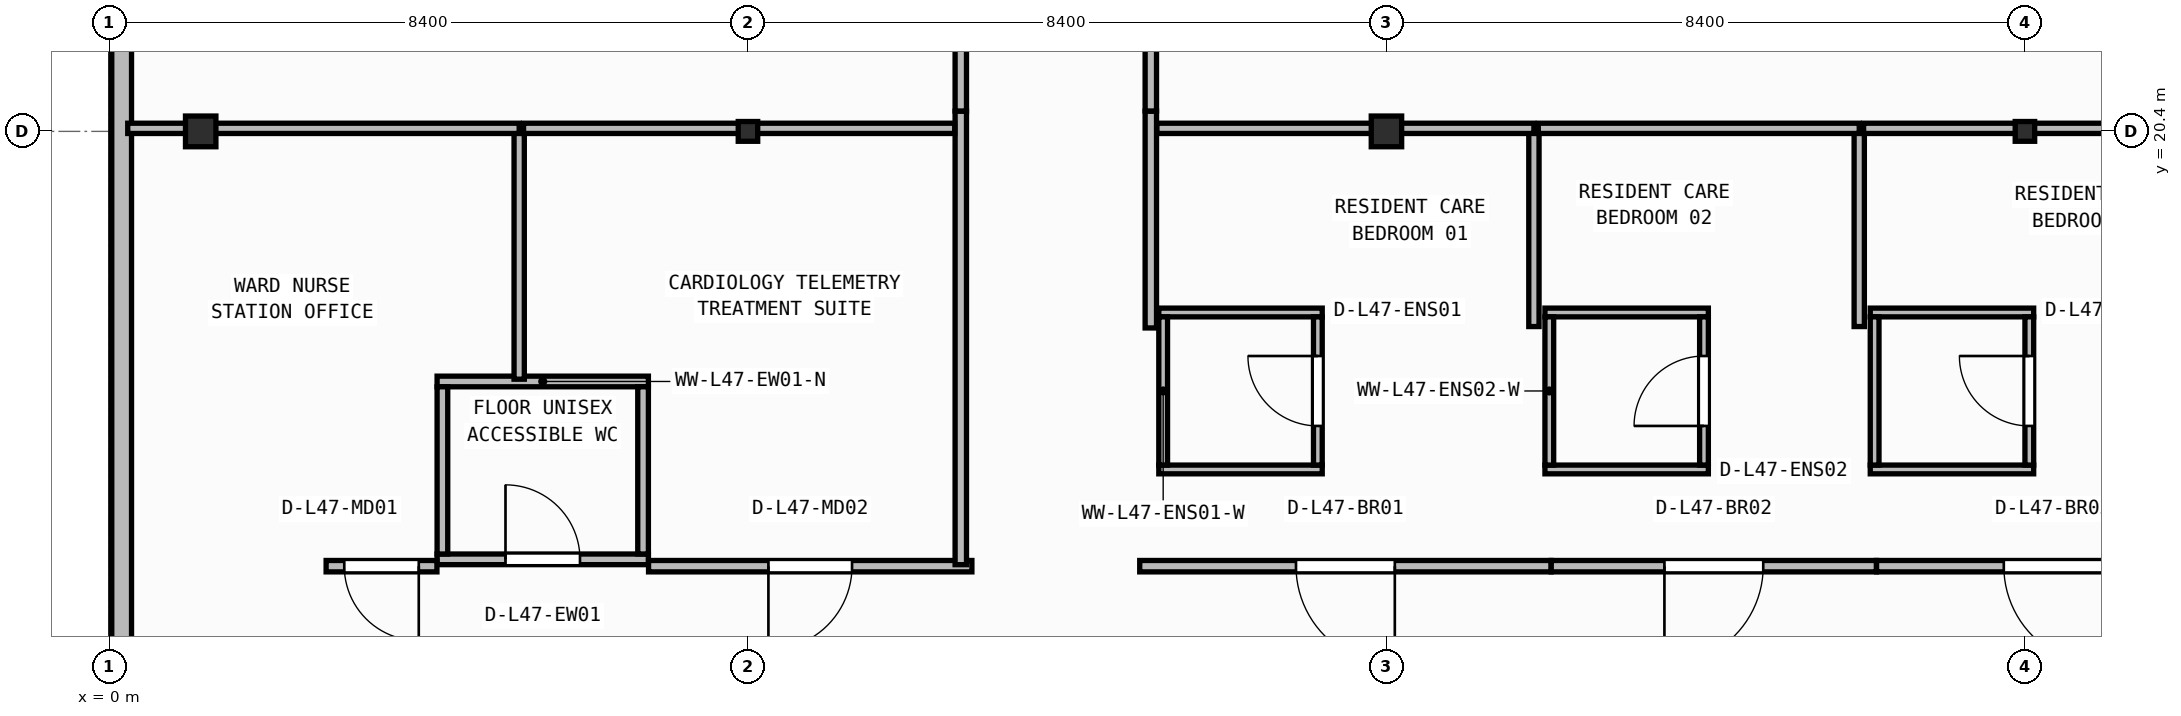
"""IFC4 building model, lengths in metres.
Left out: names, types, materials, properties, quantities, classifications, styles, units other than length and angle.
Written with IfcOpenShell. Run it as: python <this file> out.ifc"""

import sys

from ifc_helpers import new_model, si_unit, direction, frame, frame_2d, origin, origin_2d, place, context, subcontext, project, spatial, rectangle, i_section, extrude, element, fill, save


model = new_model("IFC4")
c1 = context("Model", 3, precision=1e-05, world=origin(), true_north=direction((0.0, 1.0)))
c2 = subcontext(c1, "Body", "Model", "MODEL_VIEW")
j1 = project(units=[si_unit("LENGTHUNIT", "METRE"), si_unit("PLANEANGLEUNIT", "RADIAN")], contexts=[c1])
p1 = place(None, origin())
s1 = spatial("IfcSite", under=j1, at=p1, CompositionType="ELEMENT")
p2 = place(p1, origin())
s2 = spatial("IfcBuilding", under=s1, at=p2, CompositionType="ELEMENT")
p3 = place(p2, frame((0.0, 0.0, 192.1)))
s3 = spatial("IfcBuildingStorey", under=s2, at=p3, CompositionType="ELEMENT", Elevation=192.1)
p4 = place(p3, frame((1.2, 20.4, 0.0), z_axis=(0.0, 0.0, 1.0), x_axis=(1.0, 0.0, 0.0)))
e1 = element("IfcColumn", 1, at=p4, inside=s3, PredefinedType="COLUMN", context=c2, shape_type="SweptSolid", body=[
    extrude(i_section(OverallWidth=0.4, OverallDepth=0.404, WebThickness=0.02, FlangeThickness=0.032, at=origin_2d()), origin(), (0.0, 0.0, 1.0), 3.95),
])
p5 = place(p3, frame((8.4, 20.4, 0.0), z_axis=(0.0, 0.0, 1.0), x_axis=(1.0, 0.0, 0.0)))
e2 = element("IfcColumn", 2, at=p5, inside=s3, PredefinedType="COLUMN", context=c2, shape_type="SweptSolid", body=[
    extrude(i_section(OverallWidth=0.256, OverallDepth=0.26, WebThickness=0.01, FlangeThickness=0.017, FilletRadius=0.013, at=origin_2d()), origin(), (0.0, 0.0, 1.0), 3.95),
])
p6 = place(p3, frame((16.8, 20.4, 0.0), z_axis=(0.0, 0.0, 1.0), x_axis=(1.0, 0.0, 0.0)))
e3 = element("IfcColumn", 3, at=p6, inside=s3, PredefinedType="COLUMN", context=c2, shape_type="SweptSolid", body=[
    extrude(i_section(OverallWidth=0.4, OverallDepth=0.404, WebThickness=0.02, FlangeThickness=0.032, at=origin_2d()), origin(), (0.0, 0.0, 1.0), 3.95),
])
p7 = place(p3, frame((25.2, 20.4, 0.0), z_axis=(0.0, 0.0, 1.0), x_axis=(1.0, 0.0, 0.0)))
e4 = element("IfcColumn", 4, at=p7, inside=s3, PredefinedType="COLUMN", context=c2, shape_type="SweptSolid", body=[
    extrude(i_section(OverallWidth=0.256, OverallDepth=0.26, WebThickness=0.01, FlangeThickness=0.017, FilletRadius=0.013, at=origin_2d()), origin(), (0.0, 0.0, 1.0), 3.95),
])
p8 = place(p3, frame((0.16, 40.14, 0.0), z_axis=(0.0, 0.0, 1.0), x_axis=(0.0, -1.0, 0.0)))
e5 = element("IfcWall", 5, at=p8, inside=s3, PredefinedType="STANDARD", context=c2, shape_type="SweptSolid", body=[
    extrude(rectangle(XDim=37.48, YDim=0.26, at=frame_2d((18.74, 0.0))), origin(), (0.0, 0.0, 1.0), 3.71),
])
p9 = place(p8, frame((27.4, 0.0, 0.9)))
e6 = element("IfcOpeningElement", 6, at=p9, cuts=e5, PredefinedType="OPENING", context=c2, shape_type="SweptSolid", body=[
    extrude(rectangle(XDim=2.4, YDim=1.65, at=frame_2d((1.2, 0.825))), frame((0.0, 0.14, 0.0), z_axis=(0.0, -1.0, 0.0), x_axis=(1.0, 0.0, 0.0)), (0.0, 0.0, 1.0), 0.28),
])
p10 = place(p3, frame((4.31, 14.77, 0.0), z_axis=(0.0, 0.0, 1.0), x_axis=(1.0, 0.0, 0.0)))
e7 = element("IfcWall", 7, at=p10, inside=s3, PredefinedType="PARTITIONING", context=c2, shape_type="SweptSolid", body=[
    extrude(rectangle(XDim=2.78, YDim=0.14, at=frame_2d((1.39, 0.0))), origin(), (0.0, 0.0, 1.0), 3.71),
])
p11 = place(p10, frame((0.9, 0.0, 0.0)))
e8 = element("IfcOpeningElement", 8, at=p11, cuts=e7, PredefinedType="OPENING", context=c2, shape_type="SweptSolid", body=[
    extrude(rectangle(XDim=0.98, YDim=2.1, at=frame_2d((0.49, 1.05))), frame((0.0, 0.08, 0.0), z_axis=(0.0, -1.0, 0.0), x_axis=(1.0, 0.0, 0.0)), (0.0, 0.0, 1.0), 0.16),
])
p12 = place(p3, frame((4.31, 17.11, 0.0), z_axis=(0.0, 0.0, 1.0), x_axis=(1.0, 0.0, 0.0)))
e9 = element("IfcWall", 9, at=p12, inside=s3, PredefinedType="PARTITIONING", context=c2, shape_type="SweptSolid", body=[
    extrude(rectangle(XDim=2.78, YDim=0.14, at=frame_2d((1.39, 0.0))), origin(), (0.0, 0.0, 1.0), 3.71),
])
for number, where, z_axis, x_axis in (
    (10, (4.38, 14.84, 0.0), (0.0, 0.0, 1.0), (0.0, 1.0, 0.0)),
    (11, (7.02, 14.84, 0.0), (0.0, 0.0, 1.0), (0.0, 1.0, 0.0)),
):
    element("IfcWall", number, at=place(p3, frame(where, z_axis=z_axis, x_axis=x_axis)), inside=s3, PredefinedType="PARTITIONING", context=c2, shape_type="SweptSolid", body=[
        extrude(rectangle(XDim=2.2, YDim=0.14, at=frame_2d((1.1, 0.0))), origin(), (0.0, 0.0, 1.0), 3.71),
    ])
for number, where, z_axis, x_axis in (
    (12, (13.805, 15.952, 0.0), (0.0, 0.0, 1.0), (1.0, 0.0, 0.0)),
    (13, (13.805, 18.018, 0.0), (0.0, 0.0, 1.0), (1.0, 0.0, 0.0)),
):
    element("IfcWall", number, at=place(p3, frame(where, z_axis=z_axis, x_axis=x_axis)), inside=s3, PredefinedType="PARTITIONING", context=c2, shape_type="SweptSolid", body=[
        extrude(rectangle(XDim=2.15, YDim=0.115, at=frame_2d((1.075, 0.0))), origin(), (0.0, 0.0, 1.0), 3.71),
    ])
p13 = place(p3, frame((13.863, 16.01, 0.0), z_axis=(0.0, 0.0, 1.0), x_axis=(0.0, 1.0, 0.0)))
e14 = element("IfcWall", 14, at=p13, inside=s3, PredefinedType="PARTITIONING", context=c2, shape_type="SweptSolid", body=[
    extrude(rectangle(XDim=1.95, YDim=0.115, at=frame_2d((0.975, 0.0))), origin(), (0.0, 0.0, 1.0), 3.71),
])
p14 = place(p3, frame((15.897, 16.01, 0.0), z_axis=(0.0, 0.0, 1.0), x_axis=(0.0, 1.0, 0.0)))
e15 = element("IfcWall", 15, at=p14, inside=s3, PredefinedType="PARTITIONING", context=c2, shape_type="SweptSolid", body=[
    extrude(rectangle(XDim=1.95, YDim=0.115, at=frame_2d((0.975, 0.0))), origin(), (0.0, 0.0, 1.0), 3.71),
])
p15 = place(p14, frame((0.515, 0.0, 0.0)))
e16 = element("IfcOpeningElement", 16, at=p15, cuts=e15, PredefinedType="OPENING", context=c2, shape_type="SweptSolid", body=[
    extrude(rectangle(XDim=0.92, YDim=2.1, at=frame_2d((0.46, 1.05))), frame((0.0, 0.067, 0.0), z_axis=(0.0, -1.0, 0.0), x_axis=(1.0, 0.0, 0.0)), (0.0, 0.0, 1.0), 0.135),
])
for number, where, z_axis, x_axis in (
    (17, (18.885, 15.952, 0.0), (0.0, 0.0, 1.0), (1.0, 0.0, 0.0)),
    (18, (18.885, 18.018, 0.0), (0.0, 0.0, 1.0), (1.0, 0.0, 0.0)),
):
    element("IfcWall", number, at=place(p3, frame(where, z_axis=z_axis, x_axis=x_axis)), inside=s3, PredefinedType="PARTITIONING", context=c2, shape_type="SweptSolid", body=[
        extrude(rectangle(XDim=2.15, YDim=0.115, at=frame_2d((1.075, 0.0))), origin(), (0.0, 0.0, 1.0), 3.71),
    ])
p16 = place(p3, frame((18.942, 16.01, 0.0), z_axis=(0.0, 0.0, 1.0), x_axis=(0.0, 1.0, 0.0)))
e19 = element("IfcWall", 19, at=p16, inside=s3, PredefinedType="PARTITIONING", context=c2, shape_type="SweptSolid", body=[
    extrude(rectangle(XDim=1.95, YDim=0.115, at=frame_2d((0.975, 0.0))), origin(), (0.0, 0.0, 1.0), 3.71),
])
p17 = place(p3, frame((20.978, 16.01, 0.0), z_axis=(0.0, 0.0, 1.0), x_axis=(0.0, 1.0, 0.0)))
e20 = element("IfcWall", 20, at=p17, inside=s3, PredefinedType="PARTITIONING", context=c2, shape_type="SweptSolid", body=[
    extrude(rectangle(XDim=1.95, YDim=0.115, at=frame_2d((0.975, 0.0))), origin(), (0.0, 0.0, 1.0), 3.71),
])
p18 = place(p17, frame((0.515, 0.0, 0.0)))
e21 = element("IfcOpeningElement", 21, at=p18, cuts=e20, PredefinedType="OPENING", context=c2, shape_type="SweptSolid", body=[
    extrude(rectangle(XDim=0.92, YDim=2.1, at=frame_2d((0.46, 1.05))), frame((0.0, 0.067, 0.0), z_axis=(0.0, -1.0, 0.0), x_axis=(1.0, 0.0, 0.0)), (0.0, 0.0, 1.0), 0.135),
])
p19 = place(p3, frame((23.165, 15.952, 0.0), z_axis=(0.0, 0.0, 1.0), x_axis=(1.0, 0.0, 0.0)))
e22 = element("IfcWall", 22, at=p19, inside=s3, PredefinedType="PARTITIONING", context=c2, shape_type="SweptSolid", body=[
    extrude(rectangle(XDim=2.15, YDim=0.115, at=frame_2d((1.075, 0.0))), origin(), (0.0, 0.0, 1.0), 3.329),
])
p20 = place(p3, frame((23.165, 18.018, 0.0), z_axis=(0.0, 0.0, 1.0), x_axis=(1.0, 0.0, 0.0)))
e23 = element("IfcWall", 23, at=p20, inside=s3, PredefinedType="PARTITIONING", context=c2, shape_type="SweptSolid", body=[
    extrude(rectangle(XDim=2.15, YDim=0.115, at=frame_2d((1.075, 0.0))), origin(), (0.0, 0.0, 1.0), 3.71),
])
p21 = place(p3, frame((23.222, 16.01, 0.0), z_axis=(0.0, 0.0, 1.0), x_axis=(0.0, 1.0, 0.0)))
e24 = element("IfcWall", 24, at=p21, inside=s3, PredefinedType="PARTITIONING", context=c2, shape_type="SweptSolid", body=[
    extrude(rectangle(XDim=1.95, YDim=0.115, at=frame_2d((0.975, 0.0))), origin(), (0.0, 0.0, 1.0), 3.71),
])
p22 = place(p3, frame((25.258, 16.01, 0.0), z_axis=(0.0, 0.0, 1.0), x_axis=(0.0, 1.0, 0.0)))
e25 = element("IfcWall", 25, at=p22, inside=s3, PredefinedType="PARTITIONING", context=c2, shape_type="SweptSolid", body=[
    extrude(rectangle(XDim=1.95, YDim=0.115, at=frame_2d((0.975, 0.0))), origin(), (0.0, 0.0, 1.0), 3.152),
])
p23 = place(p22, frame((0.515, 0.0, 0.0)))
e26 = element("IfcOpeningElement", 26, at=p23, cuts=e25, PredefinedType="OPENING", context=c2, shape_type="SweptSolid", body=[
    extrude(rectangle(XDim=0.92, YDim=2.1, at=frame_2d((0.46, 1.05))), frame((0.0, 0.067, 0.0), z_axis=(0.0, -1.0, 0.0), x_axis=(1.0, 0.0, 0.0)), (0.0, 0.0, 1.0), 0.135),
])
p24 = place(p3, frame((4.308, 14.68, 0.0), z_axis=(0.0, 0.0, 1.0), x_axis=(-1.0, 0.0, 0.0)))
e27 = element("IfcWall", 27, at=p24, inside=s3, PredefinedType="PARTITIONING", context=c2, shape_type="SweptSolid", body=[
    extrude(rectangle(XDim=1.458, YDim=0.15, at=frame_2d((0.729, 0.0))), origin(), (0.0, 0.0, 1.0), 3.71),
])
p25 = place(p24, frame((0.239, 0.0, 0.0)))
e28 = element("IfcOpeningElement", 28, at=p25, cuts=e27, PredefinedType="OPENING", context=c2, shape_type="SweptSolid", body=[
    extrude(rectangle(XDim=0.98, YDim=2.1, at=frame_2d((0.49, 1.05))), frame((0.0, 0.085, 0.0), z_axis=(0.0, -1.0, 0.0), x_axis=(1.0, 0.0, 0.0)), (0.0, 0.0, 1.0), 0.17),
])
p26 = place(p3, frame((11.346, 14.68, 0.0), z_axis=(0.0, 0.0, 1.0), x_axis=(-1.0, 0.0, 0.0)))
e29 = element("IfcWall", 29, at=p26, inside=s3, PredefinedType="PARTITIONING", context=c2, shape_type="SweptSolid", body=[
    extrude(rectangle(XDim=4.254, YDim=0.15, at=frame_2d((2.127, 0.0))), origin(), (0.0, 0.0, 1.0), 3.71),
])
p27 = place(p26, frame((1.577, 0.0, 0.0)))
e30 = element("IfcOpeningElement", 30, at=p27, cuts=e29, PredefinedType="OPENING", context=c2, shape_type="SweptSolid", body=[
    extrude(rectangle(XDim=1.1, YDim=2.1, at=frame_2d((0.55, 1.05))), frame((0.0, 0.085, 0.0), z_axis=(0.0, -1.0, 0.0), x_axis=(1.0, 0.0, 0.0)), (0.0, 0.0, 1.0), 0.17),
])
p28 = place(p3, frame((18.966, 14.68, 0.0), z_axis=(0.0, 0.0, 1.0), x_axis=(-1.0, 0.0, 0.0)))
e31 = element("IfcWall", 31, at=p28, inside=s3, PredefinedType="PARTITIONING", context=c2, shape_type="SweptSolid", body=[
    extrude(rectangle(XDim=5.412, YDim=0.15, at=frame_2d((2.706, 0.0))), origin(), (0.0, 0.0, 1.0), 3.71),
])
p29 = place(p28, frame((2.056, 0.0, 0.0)))
e32 = element("IfcOpeningElement", 32, at=p29, cuts=e31, PredefinedType="OPENING", context=c2, shape_type="SweptSolid", body=[
    extrude(rectangle(XDim=1.3, YDim=2.15, at=frame_2d((0.65, 1.075))), frame((0.0, 0.085, 0.0), z_axis=(0.0, -1.0, 0.0), x_axis=(1.0, 0.0, 0.0)), (0.0, 0.0, 1.0), 0.17),
])
p30 = place(p3, frame((23.246, 14.68, 0.0), z_axis=(0.0, 0.0, 1.0), x_axis=(-1.0, 0.0, 0.0)))
e33 = element("IfcWall", 33, at=p30, inside=s3, PredefinedType="PARTITIONING", context=c2, shape_type="SweptSolid", body=[
    extrude(rectangle(XDim=4.278, YDim=0.15, at=frame_2d((2.139, 0.0))), origin(), (0.0, 0.0, 1.0), 3.71),
])
p31 = place(p30, frame((1.489, 0.0, 0.0)))
e34 = element("IfcOpeningElement", 34, at=p31, cuts=e33, PredefinedType="OPENING", context=c2, shape_type="SweptSolid", body=[
    extrude(rectangle(XDim=1.3, YDim=2.15, at=frame_2d((0.65, 1.075))), frame((0.0, 0.085, 0.0), z_axis=(0.0, -1.0, 0.0), x_axis=(1.0, 0.0, 0.0)), (0.0, 0.0, 1.0), 0.17),
])
p32 = place(p3, frame((27.896, 14.68, 0.0), z_axis=(0.0, 0.0, 1.0), x_axis=(-1.0, 0.0, 0.0)))
e35 = element("IfcWall", 35, at=p32, inside=s3, PredefinedType="PARTITIONING", context=c2, shape_type="SweptSolid", body=[
    extrude(rectangle(XDim=4.648, YDim=0.15, at=frame_2d((2.324, 0.0))), origin(), (0.0, 0.0, 1.0), 3.71),
])
p33 = place(p32, frame((1.674, 0.0, 0.0)))
e36 = element("IfcOpeningElement", 36, at=p33, cuts=e35, PredefinedType="OPENING", context=c2, shape_type="SweptSolid", body=[
    extrude(rectangle(XDim=1.3, YDim=2.15, at=frame_2d((0.65, 1.075))), frame((0.0, 0.085, 0.0), z_axis=(0.0, -1.0, 0.0), x_axis=(1.0, 0.0, 0.0)), (0.0, 0.0, 1.0), 0.17),
])
p34 = place(p3, frame((11.2, 20.666, 0.0), z_axis=(0.0, 0.0, 1.0), x_axis=(0.0, -1.0, 0.0)))
e37 = element("IfcWall", 37, at=p34, inside=s3, PredefinedType="PARTITIONING", context=c2, shape_type="SweptSolid", body=[
    extrude(rectangle(XDim=5.966, YDim=0.15, at=frame_2d((2.983, 0.0))), origin(), (0.0, 0.0, 1.0), 3.71),
])
p35 = place(p3, frame((13.7, 17.814, 0.0), z_axis=(0.0, 0.0, 1.0), x_axis=(0.0, 1.0, 0.0)))
e38 = element("IfcWall", 38, at=p35, inside=s3, PredefinedType="PARTITIONING", context=c2, shape_type="SweptSolid", body=[
    extrude(rectangle(XDim=2.852, YDim=0.15, at=frame_2d((1.426, 0.0))), origin(), (0.0, 0.0, 1.0), 3.71),
])
p36 = place(p3, frame((11.2, 27.26, 0.0), z_axis=(0.0, 0.0, 1.0), x_axis=(0.0, -1.0, 0.0)))
e39 = element("IfcWall", 39, at=p36, inside=s3, PredefinedType="PARTITIONING", context=c2, shape_type="SweptSolid", body=[
    extrude(rectangle(XDim=6.592, YDim=0.15, at=frame_2d((3.296, 0.0))), origin(), (0.0, 0.0, 1.0), 3.71),
])
p37 = place(p36, frame((2.746, 0.0, 0.0)))
e40 = element("IfcOpeningElement", 40, at=p37, cuts=e39, PredefinedType="OPENING", context=c2, shape_type="SweptSolid", body=[
    extrude(rectangle(XDim=1.1, YDim=2.1, at=frame_2d((0.55, 1.05))), frame((0.0, 0.085, 0.0), z_axis=(0.0, -1.0, 0.0), x_axis=(1.0, 0.0, 0.0)), (0.0, 0.0, 1.0), 0.17),
])
p38 = place(p3, frame((13.7, 20.668, 0.0), z_axis=(0.0, 0.0, 1.0), x_axis=(0.0, 1.0, 0.0)))
e41 = element("IfcWall", 41, at=p38, inside=s3, PredefinedType="PARTITIONING", context=c2, shape_type="SweptSolid", body=[
    extrude(rectangle(XDim=6.592, YDim=0.15, at=frame_2d((3.296, 0.0))), origin(), (0.0, 0.0, 1.0), 3.71),
])
p39 = place(p38, frame((2.746, 0.0, 0.0)))
e42 = element("IfcOpeningElement", 42, at=p39, cuts=e41, PredefinedType="OPENING", context=c2, shape_type="SweptSolid", body=[
    extrude(rectangle(XDim=1.1, YDim=2.1, at=frame_2d((0.55, 1.05))), frame((0.0, 0.085, 0.0), z_axis=(0.0, -1.0, 0.0), x_axis=(1.0, 0.0, 0.0)), (0.0, 0.0, 1.0), 0.17),
])
p40 = place(p3, frame((5.39, 17.14, 0.0), z_axis=(0.0, 0.0, 1.0), x_axis=(0.0, 1.0, 0.0)))
e43 = element("IfcWall", 43, at=p40, inside=s3, PredefinedType="PARTITIONING", context=c2, shape_type="SweptSolid", body=[
    extrude(rectangle(XDim=3.3, YDim=0.135, at=frame_2d((1.65, 0.0))), origin(), (0.0, 0.0, 1.0), 3.71),
])
p41 = place(p3, frame((5.39, 20.44, 0.0), z_axis=(0.0, 0.0, 1.0), x_axis=(-1.0, 0.0, 0.0)))
e44 = element("IfcWall", 44, at=p41, inside=s3, PredefinedType="PARTITIONING", context=c2, shape_type="SweptSolid", body=[
    extrude(rectangle(XDim=5.15, YDim=0.135, at=frame_2d((2.575, 0.0))), origin(), (0.0, 0.0, 1.0), 3.152),
])
p42 = place(p3, frame((11.12, 20.44, 0.0), z_axis=(0.0, 0.0, 1.0), x_axis=(-1.0, 0.0, 0.0)))
e45 = element("IfcWall", 45, at=p42, inside=s3, PredefinedType="PARTITIONING", context=c2, shape_type="SweptSolid", body=[
    extrude(rectangle(XDim=5.673, YDim=0.135, at=frame_2d((2.836, 0.0))), origin(), (0.0, 0.0, 1.0), 3.152),
])
p43 = place(p3, frame((18.74, 17.833, 0.0), z_axis=(0.0, 0.0, 1.0), x_axis=(0.0, 1.0, 0.0)))
e46 = element("IfcWall", 46, at=p43, inside=s3, PredefinedType="PARTITIONING", context=c2, shape_type="SweptSolid", body=[
    extrude(rectangle(XDim=2.607, YDim=0.135, at=frame_2d((1.304, 0.0))), origin(), (0.0, 0.0, 1.0), 3.71),
])
p44 = place(p3, frame((18.74, 20.44, 0.0), z_axis=(0.0, 0.0, 1.0), x_axis=(-1.0, 0.0, 0.0)))
e47 = element("IfcWall", 47, at=p44, inside=s3, PredefinedType="PARTITIONING", context=c2, shape_type="SweptSolid", body=[
    extrude(rectangle(XDim=4.96, YDim=0.135, at=frame_2d((2.48, 0.0))), origin(), (0.0, 0.0, 1.0), 3.152),
])
p45 = place(p3, frame((23.02, 17.833, 0.0), z_axis=(0.0, 0.0, 1.0), x_axis=(0.0, 1.0, 0.0)))
e48 = element("IfcWall", 48, at=p45, inside=s3, PredefinedType="PARTITIONING", context=c2, shape_type="SweptSolid", body=[
    extrude(rectangle(XDim=2.607, YDim=0.135, at=frame_2d((1.304, 0.0))), origin(), (0.0, 0.0, 1.0), 3.71),
])
p46 = place(p3, frame((23.02, 20.44, 0.0), z_axis=(0.0, 0.0, 1.0), x_axis=(-1.0, 0.0, 0.0)))
e49 = element("IfcWall", 49, at=p46, inside=s3, PredefinedType="PARTITIONING", context=c2, shape_type="SweptSolid", body=[
    extrude(rectangle(XDim=4.222, YDim=0.135, at=frame_2d((2.111, 0.0))), origin(), (0.0, 0.0, 1.0), 3.152),
])
p47 = place(p3, frame((27.67, 20.44, 0.0), z_axis=(0.0, 0.0, 1.0), x_axis=(-1.0, 0.0, 0.0)))
e50 = element("IfcWall", 50, at=p47, inside=s3, PredefinedType="PARTITIONING", context=c2, shape_type="SweptSolid", body=[
    extrude(rectangle(XDim=4.593, YDim=0.135, at=frame_2d((2.296, 0.0))), origin(), (0.0, 0.0, 1.0), 3.152),
])
p48 = place(p11, origin())
e51 = element("IfcDoor", 51, at=p48, inside=s3, OperationType="SINGLE_SWING_LEFT", PredefinedType="DOOR", context=c2, shape_type="SweptSolid", body=[
    extrude(rectangle(XDim=0.98, YDim=2.1, at=frame_2d((0.49, 1.05))), frame((0.0, 0.025, 0.0), z_axis=(0.0, -1.0, 0.0), x_axis=(1.0, 0.0, 0.0)), (0.0, 0.0, 1.0), 0.05),
])
fill(e8, e51)
p49 = place(p15, origin())
e52 = element("IfcDoor", 52, at=p49, inside=s3, OperationType="SINGLE_SWING_RIGHT", PredefinedType="DOOR", context=c2, shape_type="SweptSolid", body=[
    extrude(rectangle(XDim=0.92, YDim=2.1, at=frame_2d((0.46, 1.05))), frame((0.0, 0.025, 0.0), z_axis=(0.0, -1.0, 0.0), x_axis=(1.0, 0.0, 0.0)), (0.0, 0.0, 1.0), 0.05),
])
fill(e16, e52)
p50 = place(p18, origin())
e53 = element("IfcDoor", 53, at=p50, inside=s3, OperationType="SINGLE_SWING_LEFT", PredefinedType="DOOR", context=c2, shape_type="SweptSolid", body=[
    extrude(rectangle(XDim=0.92, YDim=2.1, at=frame_2d((0.46, 1.05))), frame((0.0, 0.025, 0.0), z_axis=(0.0, -1.0, 0.0), x_axis=(1.0, 0.0, 0.0)), (0.0, 0.0, 1.0), 0.05),
])
fill(e21, e53)
p51 = place(p23, origin())
e54 = element("IfcDoor", 54, at=p51, inside=s3, OperationType="SINGLE_SWING_RIGHT", PredefinedType="DOOR", context=c2, shape_type="SweptSolid", body=[
    extrude(rectangle(XDim=0.92, YDim=2.1, at=frame_2d((0.46, 1.05))), frame((0.0, 0.025, 0.0), z_axis=(0.0, -1.0, 0.0), x_axis=(1.0, 0.0, 0.0)), (0.0, 0.0, 1.0), 0.05),
])
fill(e26, e54)
p52 = place(p25, origin())
e55 = element("IfcDoor", 55, at=p52, inside=s3, OperationType="SINGLE_SWING_LEFT", PredefinedType="DOOR", context=c2, shape_type="SweptSolid", body=[
    extrude(rectangle(XDim=0.98, YDim=2.1, at=frame_2d((0.49, 1.05))), frame((0.0, 0.025, 0.0), z_axis=(0.0, -1.0, 0.0), x_axis=(1.0, 0.0, 0.0)), (0.0, 0.0, 1.0), 0.05),
])
fill(e28, e55)
p53 = place(p27, origin())
e56 = element("IfcDoor", 56, at=p53, inside=s3, OperationType="SINGLE_SWING_RIGHT", PredefinedType="DOOR", context=c2, shape_type="SweptSolid", body=[
    extrude(rectangle(XDim=1.1, YDim=2.1, at=frame_2d((0.55, 1.05))), frame((0.0, 0.025, 0.0), z_axis=(0.0, -1.0, 0.0), x_axis=(1.0, 0.0, 0.0)), (0.0, 0.0, 1.0), 0.05),
])
fill(e30, e56)
p54 = place(p29, origin())
e57 = element("IfcDoor", 57, at=p54, inside=s3, OperationType="SINGLE_SWING_LEFT", PredefinedType="DOOR", context=c2, shape_type="SweptSolid", body=[
    extrude(rectangle(XDim=1.3, YDim=2.15, at=frame_2d((0.65, 1.075))), frame((0.0, 0.025, 0.0), z_axis=(0.0, -1.0, 0.0), x_axis=(1.0, 0.0, 0.0)), (0.0, 0.0, 1.0), 0.05),
])
fill(e32, e57)
p55 = place(p31, origin())
e58 = element("IfcDoor", 58, at=p55, inside=s3, OperationType="SINGLE_SWING_RIGHT", PredefinedType="DOOR", context=c2, shape_type="SweptSolid", body=[
    extrude(rectangle(XDim=1.3, YDim=2.15, at=frame_2d((0.65, 1.075))), frame((0.0, 0.025, 0.0), z_axis=(0.0, -1.0, 0.0), x_axis=(1.0, 0.0, 0.0)), (0.0, 0.0, 1.0), 0.05),
])
fill(e34, e58)
p56 = place(p33, origin())
e59 = element("IfcDoor", 59, at=p56, inside=s3, OperationType="SINGLE_SWING_LEFT", PredefinedType="DOOR", context=c2, shape_type="SweptSolid", body=[
    extrude(rectangle(XDim=1.3, YDim=2.15, at=frame_2d((0.65, 1.075))), frame((0.0, 0.025, 0.0), z_axis=(0.0, -1.0, 0.0), x_axis=(1.0, 0.0, 0.0)), (0.0, 0.0, 1.0), 0.05),
])
fill(e36, e59)
save(model, sys.argv[1])
